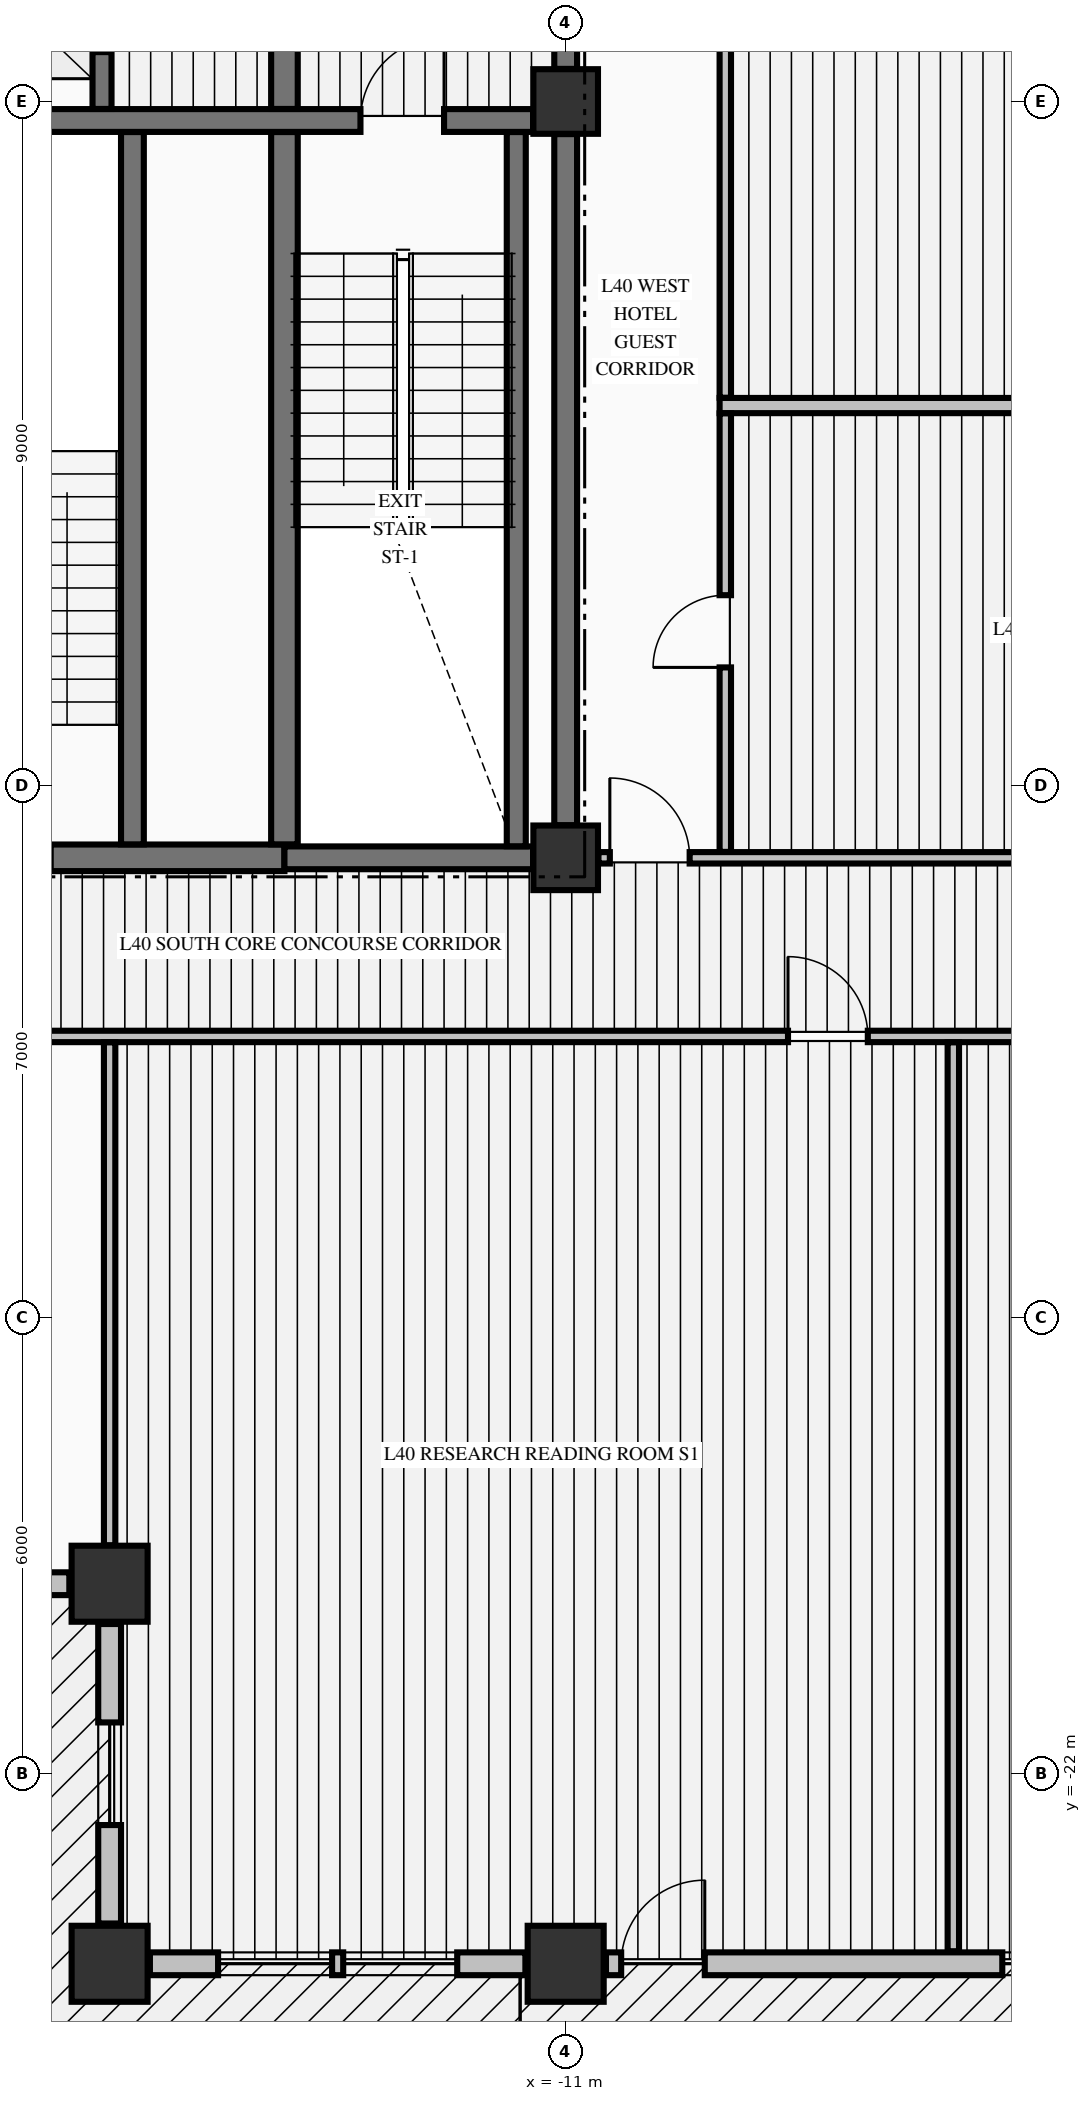
"""IFC4 building model, lengths in metres.
Left out: names, types, materials, properties, quantities, classifications, styles, units other than length and angle.
Written with IfcOpenShell. Run it as: python <this file> out.ifc"""

import sys

from ifc_helpers import new_model, si_unit, direction, frame, frame_2d, origin, origin_2d, place, context, subcontext, project, spatial, rectangle, extrude, element, fill, save


model = new_model("IFC4")
c1 = context("Model", 3, precision=1e-05, world=origin(), true_north=direction((0.0, 1.0)))
c2 = subcontext(c1, "Body", "Model", "MODEL_VIEW")
j1 = project(units=[si_unit("LENGTHUNIT", "METRE"), si_unit("PLANEANGLEUNIT", "RADIAN")], contexts=[c1])
p1 = place(None, origin())
s1 = spatial("IfcSite", under=j1, at=p1, CompositionType="ELEMENT")
p2 = place(p1, origin())
s2 = spatial("IfcBuilding", under=s1, at=p2, CompositionType="ELEMENT")
p3 = place(p2, frame((0.0, 0.0, 158.24)))
s3 = spatial("IfcBuildingStorey", under=s2, at=p3, CompositionType="ELEMENT", Elevation=158.24)
for number, where, z_axis, x_axis in (
    (1, (-17.0, -24.5, -0.425), (0.0, 0.0, 1.0), (1.0, 0.0, 0.0)),
    (2, (-11.0, -24.5, -0.425), (0.0, 0.0, 1.0), (1.0, 0.0, 0.0)),
    (3, (-17.0, -19.5, -0.425), (0.0, 0.0, 1.0), (1.0, 0.0, 0.0)),
):
    element("IfcColumn", number, at=place(p3, frame(where, z_axis=z_axis, x_axis=x_axis)), inside=s3, PredefinedType="COLUMN", context=c2, shape_type="SweptSolid", body=[
        extrude(rectangle(XDim=1.0, YDim=1.0, at=origin_2d()), origin(), (0.0, 0.0, 1.0), 4.595),
    ])
for number, where, z_axis, x_axis in (
    (4, (-11.0, -9.95, -0.425), (0.0, 0.0, 1.0), (1.0, 0.0, 0.0)),
    (5, (-11.0, 0.0, -0.425), (0.0, 0.0, 1.0), (1.0, 0.0, 0.0)),
):
    element("IfcColumn", number, at=place(p3, frame(where, z_axis=z_axis, x_axis=x_axis)), inside=s3, PredefinedType="COLUMN", context=c2, shape_type="SweptSolid", body=[
        extrude(rectangle(XDim=0.85, YDim=0.85, at=origin_2d()), origin(), (0.0, 0.0, 1.0), 4.595),
    ])
p4 = place(p3, frame((-21.47, -19.5, 0.0), z_axis=(0.0, 0.0, 1.0), x_axis=(1.0, 0.0, 0.0)))
e6 = element("IfcWall", 6, at=p4, inside=s3, PredefinedType="STANDARD", context=c2, shape_type="SweptSolid", body=[
    extrude(rectangle(XDim=3.94, YDim=0.3, at=frame_2d((1.97, 0.0))), origin(), (0.0, 0.0, 1.0), 3.562),
])
p5 = place(p4, frame((1.295, 0.0, 0.68)))
e7 = element("IfcOpeningElement", 7, at=p5, cuts=e6, PredefinedType="OPENING", context=c2, shape_type="SweptSolid", body=[
    extrude(rectangle(XDim=1.35, YDim=1.42, at=frame_2d((0.675, 0.71))), frame((0.0, 0.16, 0.0), z_axis=(0.0, -1.0, 0.0), x_axis=(1.0, 0.0, 0.0)), (0.0, 0.0, 1.0), 0.32),
])
p6 = place(p3, frame((-17.0, -20.03, 0.0), z_axis=(0.0, 0.0, 1.0), x_axis=(0.0, -1.0, 0.0)))
e8 = element("IfcWall", 8, at=p6, inside=s3, PredefinedType="STANDARD", context=c2, shape_type="SweptSolid", body=[
    extrude(rectangle(XDim=3.94, YDim=0.3, at=frame_2d((1.97, 0.0))), origin(), (0.0, 0.0, 1.0), 3.562),
])
p7 = place(p6, frame((1.295, 0.0, 0.68)))
e9 = element("IfcOpeningElement", 9, at=p7, cuts=e8, PredefinedType="OPENING", context=c2, shape_type="SweptSolid", body=[
    extrude(rectangle(XDim=1.35, YDim=1.42, at=frame_2d((0.675, 0.71))), frame((0.0, 0.16, 0.0), z_axis=(0.0, -1.0, 0.0), x_axis=(1.0, 0.0, 0.0)), (0.0, 0.0, 1.0), 0.32),
])
p8 = place(p3, frame((-16.47, -24.5, 0.0), z_axis=(0.0, 0.0, 1.0), x_axis=(1.0, 0.0, 0.0)))
e10 = element("IfcWall", 10, at=p8, inside=s3, PredefinedType="STANDARD", context=c2, shape_type="SweptSolid", body=[
    extrude(rectangle(XDim=4.94, YDim=0.3, at=frame_2d((2.47, 0.0))), origin(), (0.0, 0.0, 1.0), 3.562),
])
p9 = place(p8, frame((0.897, 0.0, 0.72)))
e11 = element("IfcOpeningElement", 11, at=p9, cuts=e10, PredefinedType="OPENING", context=c2, shape_type="SweptSolid", body=[
    extrude(rectangle(XDim=1.5, YDim=1.6, at=frame_2d((0.75, 0.8))), frame((0.0, 0.16, 0.0), z_axis=(0.0, -1.0, 0.0), x_axis=(1.0, 0.0, 0.0)), (0.0, 0.0, 1.0), 0.32),
])
p10 = place(p8, frame((2.543, 0.0, 0.72)))
e12 = element("IfcOpeningElement", 12, at=p10, cuts=e10, PredefinedType="OPENING", context=c2, shape_type="SweptSolid", body=[
    extrude(rectangle(XDim=1.5, YDim=1.6, at=frame_2d((0.75, 0.8))), frame((0.0, 0.16, 0.0), z_axis=(0.0, -1.0, 0.0), x_axis=(1.0, 0.0, 0.0)), (0.0, 0.0, 1.0), 0.32),
])
p11 = place(p3, frame((-10.47, -24.5, 0.0), z_axis=(0.0, 0.0, 1.0), x_axis=(1.0, 0.0, 0.0)))
e13 = element("IfcWall", 13, at=p11, inside=s3, PredefinedType="STANDARD", context=c2, shape_type="SweptSolid", body=[
    extrude(rectangle(XDim=9.94, YDim=0.3, at=frame_2d((4.97, 0.0))), origin(), (0.0, 0.0, 1.0), 3.562),
])
p12 = place(p11, frame((0.2, 0.0, 0.0)))
e14 = element("IfcOpeningElement", 14, at=p12, cuts=e13, PredefinedType="OPENING", context=c2, shape_type="SweptSolid", body=[
    extrude(rectangle(XDim=1.1, YDim=2.15, at=frame_2d((0.55, 1.075))), frame((0.0, 0.16, 0.0), z_axis=(0.0, -1.0, 0.0), x_axis=(1.0, 0.0, 0.0)), (0.0, 0.0, 1.0), 0.32),
])
p13 = place(p11, frame((5.214, 0.0, 0.72)))
e15 = element("IfcOpeningElement", 15, at=p13, cuts=e13, PredefinedType="OPENING", context=c2, shape_type="SweptSolid", body=[
    extrude(rectangle(XDim=1.5, YDim=1.6, at=frame_2d((0.75, 0.8))), frame((0.0, 0.16, 0.0), z_axis=(0.0, -1.0, 0.0), x_axis=(1.0, 0.0, 0.0)), (0.0, 0.0, 1.0), 0.32),
])
p14 = place(p11, frame((7.202, 0.0, 0.72)))
e16 = element("IfcOpeningElement", 16, at=p14, cuts=e13, PredefinedType="OPENING", context=c2, shape_type="SweptSolid", body=[
    extrude(rectangle(XDim=1.5, YDim=1.6, at=frame_2d((0.75, 0.8))), frame((0.0, 0.16, 0.0), z_axis=(0.0, -1.0, 0.0), x_axis=(1.0, 0.0, 0.0)), (0.0, 0.0, 1.0), 0.32),
])
p15 = place(p3, frame((-19.571, -9.95, 0.0), z_axis=(0.0, 0.0, 1.0), x_axis=(1.0, 0.0, 0.0)))
e17 = element("IfcWall", 17, at=p15, inside=s3, PredefinedType="SHEAR", context=c2, shape_type="SweptSolid", body=[
    extrude(rectangle(XDim=4.871, YDim=0.35, at=frame_2d((2.436, 0.0))), origin(), (0.0, 0.0, 1.0), 4.17),
])
p16 = place(p15, frame((0.746, 0.0, 0.0)))
e18 = element("IfcOpeningElement", 18, at=p16, cuts=e17, PredefinedType="OPENING", context=c2, shape_type="SweptSolid", body=[
    extrude(rectangle(XDim=1.05, YDim=2.15, at=frame_2d((0.525, 1.075))), frame((0.0, 0.185, 0.0), z_axis=(0.0, -1.0, 0.0), x_axis=(1.0, 0.0, 0.0)), (0.0, 0.0, 1.0), 0.37),
])
p17 = place(p3, frame((-14.7, -9.95, 0.0), z_axis=(0.0, 0.0, 1.0), x_axis=(1.0, 0.0, 0.0)))
e19 = element("IfcWall", 19, at=p17, inside=s3, PredefinedType="SHEAR", context=c2, shape_type="SweptSolid", body=[
    extrude(rectangle(XDim=3.271, YDim=0.3, at=frame_2d((1.635, 0.0))), origin(), (0.0, 0.0, 1.0), 4.17),
])
p18 = place(p3, frame((-19.571, -0.25, 0.0), z_axis=(0.0, 0.0, 1.0), x_axis=(1.0, 0.0, 0.0)))
e20 = element("IfcWall", 20, at=p18, inside=s3, PredefinedType="SHEAR", context=c2, shape_type="SweptSolid", body=[
    extrude(rectangle(XDim=8.142, YDim=0.3, at=frame_2d((4.071, 0.0))), origin(), (0.0, 0.0, 1.0), 4.17),
])
p19 = place(p18, frame((5.871, 0.0, 0.0)))
e21 = element("IfcOpeningElement", 21, at=p19, cuts=e20, PredefinedType="OPENING", context=c2, shape_type="SweptSolid", body=[
    extrude(rectangle(XDim=1.1, YDim=2.15, at=frame_2d((0.55, 1.075))), frame((0.0, 0.16, 0.0), z_axis=(0.0, -1.0, 0.0), x_axis=(1.0, 0.0, 0.0)), (0.0, 0.0, 1.0), 0.32),
])
p20 = place(p3, frame((-20.075, -12.3, 0.0), z_axis=(0.0, 0.0, 1.0), x_axis=(1.0, 0.0, 0.0)))
e22 = element("IfcWall", 22, at=p20, inside=s3, PredefinedType="PARTITIONING", context=c2, shape_type="SweptSolid", body=[
    extrude(rectangle(XDim=46.91, YDim=0.15, at=frame_2d((23.455, 0.0))), origin(), (0.0, 0.0, 1.0), 4.17),
])
p21 = place(p20, frame((12.0, 0.0, 0.0)))
e23 = element("IfcOpeningElement", 23, at=p21, cuts=e22, PredefinedType="OPENING", context=c2, shape_type="SweptSolid", body=[
    extrude(rectangle(XDim=1.05, YDim=2.15, at=frame_2d((0.525, 1.075))), frame((0.0, 0.085, 0.0), z_axis=(0.0, -1.0, 0.0), x_axis=(1.0, 0.0, 0.0)), (0.0, 0.0, 1.0), 0.17),
])
p22 = place(p20, frame((16.4, 0.0, 0.0)))
e24 = element("IfcOpeningElement", 24, at=p22, cuts=e22, PredefinedType="OPENING", context=c2, shape_type="SweptSolid", body=[
    extrude(rectangle(XDim=0.95, YDim=2.15, at=frame_2d((0.475, 1.075))), frame((0.0, 0.085, 0.0), z_axis=(0.0, -1.0, 0.0), x_axis=(1.0, 0.0, 0.0)), (0.0, 0.0, 1.0), 0.17),
])
p23 = place(p20, frame((22.3, 0.0, 0.0)))
e25 = element("IfcOpeningElement", 25, at=p23, cuts=e22, PredefinedType="OPENING", context=c2, shape_type="SweptSolid", body=[
    extrude(rectangle(XDim=0.95, YDim=2.15, at=frame_2d((0.475, 1.075))), frame((0.0, 0.085, 0.0), z_axis=(0.0, -1.0, 0.0), x_axis=(1.0, 0.0, 0.0)), (0.0, 0.0, 1.0), 0.17),
])
p24 = place(p20, frame((33.0, 0.0, 0.0)))
e26 = element("IfcOpeningElement", 26, at=p24, cuts=e22, PredefinedType="OPENING", context=c2, shape_type="SweptSolid", body=[
    extrude(rectangle(XDim=1.05, YDim=2.15, at=frame_2d((0.525, 1.075))), frame((0.0, 0.085, 0.0), z_axis=(0.0, -1.0, 0.0), x_axis=(1.0, 0.0, 0.0)), (0.0, 0.0, 1.0), 0.17),
])
p25 = place(p20, frame((37.05, 0.0, 0.0)))
e27 = element("IfcOpeningElement", 27, at=p25, cuts=e22, PredefinedType="OPENING", context=c2, shape_type="SweptSolid", body=[
    extrude(rectangle(XDim=0.95, YDim=2.15, at=frame_2d((0.475, 1.075))), frame((0.0, 0.085, 0.0), z_axis=(0.0, -1.0, 0.0), x_axis=(1.0, 0.0, 0.0)), (0.0, 0.0, 1.0), 0.17),
])
p26 = place(p3, frame((-10.569, -9.95, 0.0), z_axis=(0.0, 0.0, 1.0), x_axis=(1.0, 0.0, 0.0)))
e28 = element("IfcWall", 28, at=p26, inside=s3, PredefinedType="PARTITIONING", context=c2, shape_type="SweptSolid", body=[
    extrude(rectangle(XDim=21.138, YDim=0.15, at=frame_2d((10.569, 0.0))), origin(), (0.0, 0.0, 1.0), 4.17),
])
p27 = place(p26, frame((0.15, 0.0, 0.0)))
e29 = element("IfcOpeningElement", 29, at=p27, cuts=e28, PredefinedType="OPENING", context=c2, shape_type="SweptSolid", body=[
    extrude(rectangle(XDim=1.05, YDim=2.15, at=frame_2d((0.525, 1.075))), frame((0.0, 0.085, 0.0), z_axis=(0.0, -1.0, 0.0), x_axis=(1.0, 0.0, 0.0)), (0.0, 0.0, 1.0), 0.17),
])
p28 = place(p26, frame((19.938, 0.0, 0.0)))
e30 = element("IfcOpeningElement", 30, at=p28, cuts=e28, PredefinedType="OPENING", context=c2, shape_type="SweptSolid", body=[
    extrude(rectangle(XDim=1.05, YDim=2.15, at=frame_2d((0.525, 1.075))), frame((0.0, 0.085, 0.0), z_axis=(0.0, -1.0, 0.0), x_axis=(1.0, 0.0, 0.0)), (0.0, 0.0, 1.0), 0.17),
])
p29 = place(p26, frame((13.944, 0.0, 0.0)))
e31 = element("IfcOpeningElement", 31, at=p29, cuts=e28, PredefinedType="OPENING", context=c2, shape_type="SweptSolid", body=[
    extrude(rectangle(XDim=0.95, YDim=2.15, at=frame_2d((0.475, 1.075))), frame((0.0, 0.085, 0.0), z_axis=(0.0, -1.0, 0.0), x_axis=(1.0, 0.0, 0.0)), (0.0, 0.0, 1.0), 0.17),
])
p30 = place(p3, frame((-8.975, -4.0, 0.0), z_axis=(0.0, 0.0, 1.0), x_axis=(1.0, 0.0, 0.0)))
e32 = element("IfcWall", 32, at=p30, inside=s3, PredefinedType="PARTITIONING", context=c2, shape_type="SweptSolid", body=[
    extrude(rectangle(XDim=10.875, YDim=0.2, at=frame_2d((5.438, 0.0))), origin(), (0.0, 0.0, 1.0), 4.17),
])
p31 = place(p3, frame((-17.1, -0.098, 0.0), z_axis=(0.0, 0.0, 1.0), x_axis=(0.0, 1.0, 0.0)))
e33 = element("IfcWall", 33, at=p31, inside=s3, PredefinedType="SOLIDWALL", context=c2, shape_type="SweptSolid", body=[
    extrude(rectangle(XDim=2.621, YDim=0.25, at=frame_2d((1.311, 0.0))), origin(), (0.0, 0.0, 1.0), 4.17),
])
p32 = place(p31, frame((0.748, 0.0, 0.0)))
e34 = element("IfcOpeningElement", 34, at=p32, cuts=e33, PredefinedType="OPENING", context=c2, shape_type="SweptSolid", body=[
    extrude(rectangle(XDim=1.1, YDim=2.2, at=frame_2d((0.55, 1.1))), frame((0.0, 0.135, 0.0), z_axis=(0.0, -1.0, 0.0), x_axis=(1.0, 0.0, 0.0)), (0.0, 0.0, 1.0), 0.27),
])
p33 = place(p3, frame((-16.7, -9.773, 0.0), z_axis=(0.0, 0.0, 1.0), x_axis=(0.0, 1.0, 0.0)))
e35 = element("IfcWall", 35, at=p33, inside=s3, PredefinedType="SHEAR", context=c2, shape_type="SweptSolid", body=[
    extrude(rectangle(XDim=9.371, YDim=0.3, at=frame_2d((4.686, 0.0))), origin(), (0.0, 0.0, 1.0), 4.17),
])
p34 = place(p3, frame((-14.7, -9.773, 0.0), z_axis=(0.0, 0.0, 1.0), x_axis=(0.0, 1.0, 0.0)))
e36 = element("IfcWall", 36, at=p34, inside=s3, PredefinedType="SHEAR", context=c2, shape_type="SweptSolid", body=[
    extrude(rectangle(XDim=9.371, YDim=0.35, at=frame_2d((4.686, 0.0))), origin(), (0.0, 0.0, 1.0), 4.17),
])
p35 = place(p3, frame((-14.7, -0.098, 0.0), z_axis=(0.0, 0.0, 1.0), x_axis=(0.0, 1.0, 0.0)))
e37 = element("IfcWall", 37, at=p35, inside=s3, PredefinedType="SHEAR", context=c2, shape_type="SweptSolid", body=[
    extrude(rectangle(XDim=2.846, YDim=0.35, at=frame_2d((1.423, 0.0))), origin(), (0.0, 0.0, 1.0), 4.17),
])
p36 = place(p3, frame((-11.65, -9.798, 0.0), z_axis=(0.0, 0.0, 1.0), x_axis=(0.0, 1.0, 0.0)))
e38 = element("IfcWall", 38, at=p36, inside=s3, PredefinedType="SOLIDWALL", context=c2, shape_type="SweptSolid", body=[
    extrude(rectangle(XDim=9.396, YDim=0.25, at=frame_2d((4.698, 0.0))), origin(), (0.0, 0.0, 1.0), 4.17),
])
p37 = place(p3, frame((-11.0, -9.521, 0.0), z_axis=(0.0, 0.0, 1.0), x_axis=(0.0, 1.0, 0.0)))
e39 = element("IfcWall", 39, at=p37, inside=s3, PredefinedType="SHEAR", context=c2, shape_type="SweptSolid", body=[
    extrude(rectangle(XDim=9.092, YDim=0.3, at=frame_2d((4.546, 0.0))), origin(), (0.0, 0.0, 1.0), 4.17),
])
p38 = place(p3, frame((-11.0, 0.429, 0.0), z_axis=(0.0, 0.0, 1.0), x_axis=(0.0, 1.0, 0.0)))
e40 = element("IfcWall", 40, at=p38, inside=s3, PredefinedType="SHEAR", context=c2, shape_type="SweptSolid", body=[
    extrude(rectangle(XDim=2.319, YDim=0.3, at=frame_2d((1.16, 0.0))), origin(), (0.0, 0.0, 1.0), 4.17),
])
p39 = place(p38, frame((0.671, 0.0, 0.0)))
e41 = element("IfcOpeningElement", 41, at=p39, cuts=e40, PredefinedType="OPENING", context=c2, shape_type="SweptSolid", body=[
    extrude(rectangle(XDim=1.1, YDim=2.15, at=frame_2d((0.55, 1.075))), frame((0.0, 0.16, 0.0), z_axis=(0.0, -1.0, 0.0), x_axis=(1.0, 0.0, 0.0)), (0.0, 0.0, 1.0), 0.32),
])
p40 = place(p3, frame((-17.0, -18.994, 0.0), z_axis=(0.0, 0.0, 1.0), x_axis=(0.0, 1.0, 0.0)))
e42 = element("IfcWall", 42, at=p40, inside=s3, PredefinedType="PARTITIONING", context=c2, shape_type="SweptSolid", body=[
    extrude(rectangle(XDim=6.616, YDim=0.15, at=frame_2d((3.308, 0.0))), origin(), (0.0, 0.0, 1.0), 4.17),
])
p41 = place(p3, frame((-8.9, -9.872, 0.0), z_axis=(0.0, 0.0, 1.0), x_axis=(0.0, 1.0, 0.0)))
e43 = element("IfcWall", 43, at=p41, inside=s3, PredefinedType="PARTITIONING", context=c2, shape_type="SweptSolid", body=[
    extrude(rectangle(XDim=5.769, YDim=0.15, at=frame_2d((2.885, 0.0))), origin(), (0.0, 0.0, 1.0), 4.17),
])
p42 = place(p41, frame((2.427, 0.0, 0.0)))
e44 = element("IfcOpeningElement", 44, at=p42, cuts=e43, PredefinedType="OPENING", context=c2, shape_type="SweptSolid", body=[
    extrude(rectangle(XDim=0.95, YDim=2.15, at=frame_2d((0.475, 1.075))), frame((0.0, 0.085, 0.0), z_axis=(0.0, -1.0, 0.0), x_axis=(1.0, 0.0, 0.0)), (0.0, 0.0, 1.0), 0.17),
])
p43 = place(p3, frame((-8.9, -3.897, 0.0), z_axis=(0.0, 0.0, 1.0), x_axis=(0.0, 1.0, 0.0)))
e45 = element("IfcWall", 45, at=p43, inside=s3, PredefinedType="PARTITIONING", context=c2, shape_type="SweptSolid", body=[
    extrude(rectangle(XDim=14.319, YDim=0.15, at=frame_2d((7.16, 0.0))), origin(), (0.0, 0.0, 1.0), 4.17),
])
p44 = place(p43, frame((6.622, 0.0, 0.0)))
e46 = element("IfcOpeningElement", 46, at=p44, cuts=e45, PredefinedType="OPENING", context=c2, shape_type="SweptSolid", body=[
    extrude(rectangle(XDim=1.05, YDim=2.15, at=frame_2d((0.525, 1.075))), frame((0.0, 0.085, 0.0), z_axis=(0.0, -1.0, 0.0), x_axis=(1.0, 0.0, 0.0)), (0.0, 0.0, 1.0), 0.17),
])
p45 = place(p3, frame((-5.9, -24.335, 0.0), z_axis=(0.0, 0.0, 1.0), x_axis=(0.0, 1.0, 0.0)))
e47 = element("IfcWall", 47, at=p45, inside=s3, PredefinedType="PARTITIONING", context=c2, shape_type="SweptSolid", body=[
    extrude(rectangle(XDim=11.957, YDim=0.15, at=frame_2d((5.979, 0.0))), origin(), (0.0, 0.0, 1.0), 4.17),
])
p46 = place(p7, origin())
e48 = element("IfcWindow", 48, at=p46, inside=s3, PartitioningType="SINGLE_PANEL", PredefinedType="WINDOW", context=c2, shape_type="SweptSolid", body=[
    extrude(rectangle(XDim=1.35, YDim=1.42, at=frame_2d((0.675, 0.71))), frame((0.0, 0.03, 0.0), z_axis=(0.0, -1.0, 0.0), x_axis=(1.0, 0.0, 0.0)), (0.0, 0.0, 1.0), 0.06),
])
fill(e9, e48)
p47 = place(p9, origin())
e49 = element("IfcWindow", 49, at=p47, inside=s3, PartitioningType="SINGLE_PANEL", PredefinedType="WINDOW", context=c2, shape_type="SweptSolid", body=[
    extrude(rectangle(XDim=1.5, YDim=1.6, at=frame_2d((0.75, 0.8))), frame((0.0, 0.03, 0.0), z_axis=(0.0, -1.0, 0.0), x_axis=(1.0, 0.0, 0.0)), (0.0, 0.0, 1.0), 0.06),
])
fill(e11, e49)
p48 = place(p10, origin())
e50 = element("IfcWindow", 50, at=p48, inside=s3, PartitioningType="SINGLE_PANEL", PredefinedType="WINDOW", context=c2, shape_type="SweptSolid", body=[
    extrude(rectangle(XDim=1.5, YDim=1.6, at=frame_2d((0.75, 0.8))), frame((0.0, 0.03, 0.0), z_axis=(0.0, -1.0, 0.0), x_axis=(1.0, 0.0, 0.0)), (0.0, 0.0, 1.0), 0.06),
])
fill(e12, e50)
p49 = place(p12, origin())
e51 = element("IfcDoor", 51, at=p49, inside=s3, OperationType="SINGLE_SWING_RIGHT", PredefinedType="DOOR", context=c2, shape_type="SweptSolid", body=[
    extrude(rectangle(XDim=1.1, YDim=2.15, at=frame_2d((0.55, 1.075))), frame((0.0, 0.025, 0.0), z_axis=(0.0, -1.0, 0.0), x_axis=(1.0, 0.0, 0.0)), (0.0, 0.0, 1.0), 0.05),
])
fill(e14, e51)
p50 = place(p13, origin())
e52 = element("IfcWindow", 52, at=p50, inside=s3, PartitioningType="SINGLE_PANEL", PredefinedType="WINDOW", context=c2, shape_type="SweptSolid", body=[
    extrude(rectangle(XDim=1.5, YDim=1.6, at=frame_2d((0.75, 0.8))), frame((0.0, 0.03, 0.0), z_axis=(0.0, -1.0, 0.0), x_axis=(1.0, 0.0, 0.0)), (0.0, 0.0, 1.0), 0.06),
])
fill(e15, e52)
p51 = place(p19, origin())
e53 = element("IfcDoor", 53, at=p51, inside=s3, OperationType="SINGLE_SWING_RIGHT", PredefinedType="DOOR", context=c2, shape_type="SweptSolid", body=[
    extrude(rectangle(XDim=1.1, YDim=2.15, at=frame_2d((0.55, 1.075))), frame((0.0, 0.025, 0.0), z_axis=(0.0, -1.0, 0.0), x_axis=(1.0, 0.0, 0.0)), (0.0, 0.0, 1.0), 0.05),
])
fill(e21, e53)
p52 = place(p27, origin())
e54 = element("IfcDoor", 54, at=p52, inside=s3, OperationType="SINGLE_SWING_LEFT", PredefinedType="DOOR", context=c2, shape_type="SweptSolid", body=[
    extrude(rectangle(XDim=1.05, YDim=2.15, at=frame_2d((0.525, 1.075))), frame((0.0, 0.025, 0.0), z_axis=(0.0, -1.0, 0.0), x_axis=(1.0, 0.0, 0.0)), (0.0, 0.0, 1.0), 0.05),
])
fill(e29, e54)
p53 = place(p21, origin())
e55 = element("IfcDoor", 55, at=p53, inside=s3, OperationType="SINGLE_SWING_LEFT", PredefinedType="DOOR", context=c2, shape_type="SweptSolid", body=[
    extrude(rectangle(XDim=1.05, YDim=2.15, at=frame_2d((0.525, 1.075))), frame((0.0, 0.025, 0.0), z_axis=(0.0, -1.0, 0.0), x_axis=(1.0, 0.0, 0.0)), (0.0, 0.0, 1.0), 0.05),
])
fill(e23, e55)
p54 = place(p42, origin())
e56 = element("IfcDoor", 56, at=p54, inside=s3, OperationType="SINGLE_SWING_LEFT", PredefinedType="DOOR", context=c2, shape_type="SweptSolid", body=[
    extrude(rectangle(XDim=0.95, YDim=2.15, at=frame_2d((0.475, 1.075))), frame((0.0, 0.025, 0.0), z_axis=(0.0, -1.0, 0.0), x_axis=(1.0, 0.0, 0.0)), (0.0, 0.0, 1.0), 0.05),
])
fill(e44, e56)
save(model, sys.argv[1])
